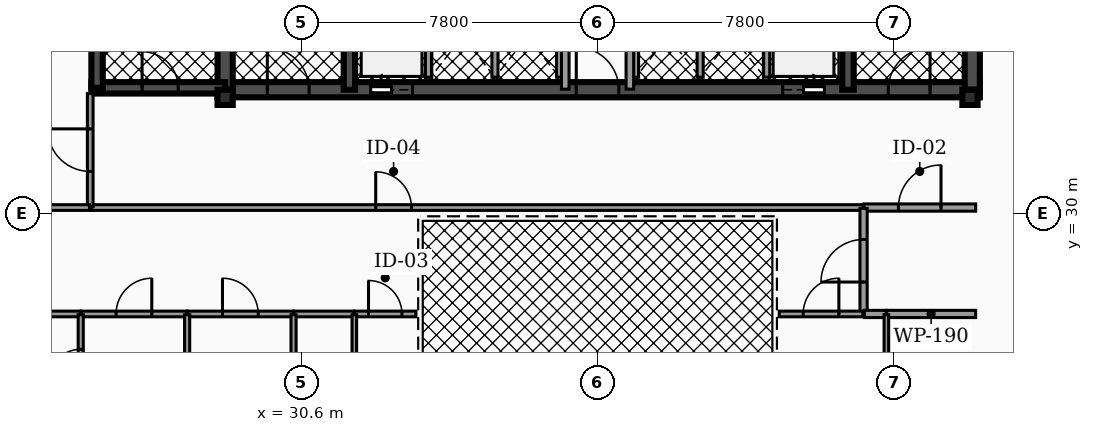
"""IFC4 building model, lengths in metres.
Left out: names, types, materials, properties, quantities, classifications, styles, units other than length and angle.
Written with IfcOpenShell. Run it as: python <this file> out.ifc"""

import sys

from ifc_helpers import new_model, si_unit, direction, frame, frame_2d, origin, origin_2d, place, context, subcontext, project, spatial, rectangle, hollow_rectangle, extrude, element, fill, save


model = new_model("IFC4")
c1 = context("Model", 3, precision=1e-05, world=origin(), true_north=direction((0.0, 1.0)))
c2 = subcontext(c1, "Body", "Model", "MODEL_VIEW")
j1 = project(units=[si_unit("LENGTHUNIT", "METRE"), si_unit("PLANEANGLEUNIT", "RADIAN")], contexts=[c1])
p1 = place(None, origin())
s1 = spatial("IfcSite", under=j1, at=p1, CompositionType="ELEMENT")
p2 = place(p1, origin())
s2 = spatial("IfcBuilding", under=s1, at=p2, CompositionType="ELEMENT")
p3 = place(p2, frame((0.0, 0.0, 13.94)))
s3 = spatial("IfcBuildingStorey", under=s2, at=p3, CompositionType="ELEMENT", Elevation=13.94)
p4 = place(p3, frame((28.4, 33.25, 0.0), z_axis=(0.0, 0.0, 1.0), x_axis=(1.0, 0.0, 0.0)))
e1 = element("IfcWall", 1, at=p4, inside=s3, PredefinedType="SHEAR", context=c2, shape_type="SweptSolid", body=[
    extrude(rectangle(XDim=20.06, YDim=0.4, at=frame_2d((10.03, 0.0))), origin(), (0.0, 0.0, 1.0), 4.14),
])
p5 = place(p4, frame((4.03, 0.0, 0.0)))
e2 = element("IfcOpeningElement", 2, at=p5, cuts=e1, PredefinedType="OPENING", context=c2, shape_type="SweptSolid", body=[
    extrude(rectangle(XDim=1.1, YDim=2.15, at=frame_2d((0.55, 1.075))), frame((0.0, 0.21, 0.0), z_axis=(0.0, -1.0, 0.0), x_axis=(1.0, 0.0, 0.0)), (0.0, 0.0, 1.0), 0.42),
])
p6 = place(p4, frame((14.87, 0.0, 0.0)))
e3 = element("IfcOpeningElement", 3, at=p6, cuts=e1, PredefinedType="OPENING", context=c2, shape_type="SweptSolid", body=[
    extrude(rectangle(XDim=1.1, YDim=2.15, at=frame_2d((0.55, 1.075))), frame((0.0, 0.21, 0.0), z_axis=(0.0, -1.0, 0.0), x_axis=(1.0, 0.0, 0.0)), (0.0, 0.0, 1.0), 0.42),
])
p7 = place(p4, frame((1.31, 0.0, 0.0)))
e4 = element("IfcOpeningElement", 4, at=p7, cuts=e1, PredefinedType="OPENING", context=c2, shape_type="SweptSolid", body=[
    extrude(rectangle(XDim=1.1, YDim=2.2, at=frame_2d((0.55, 1.1))), frame((0.0, 0.21, 0.0), z_axis=(0.0, -1.0, 0.0), x_axis=(1.0, 0.0, 0.0)), (0.0, 0.0, 1.0), 0.42),
])
p8 = place(p4, frame((9.44, 0.0, 0.0)))
e5 = element("IfcOpeningElement", 5, at=p8, cuts=e1, PredefinedType="OPENING", context=c2, shape_type="SweptSolid", body=[
    extrude(rectangle(XDim=1.12, YDim=2.05, at=frame_2d((0.56, 1.025))), frame((0.0, 0.21, 0.0), z_axis=(0.0, -1.0, 0.0), x_axis=(1.0, 0.0, 0.0)), (0.0, 0.0, 1.0), 0.42),
])
p9 = place(p4, frame((17.65, 0.0, 0.0)))
e6 = element("IfcOpeningElement", 6, at=p9, cuts=e1, PredefinedType="OPENING", context=c2, shape_type="SweptSolid", body=[
    extrude(rectangle(XDim=1.1, YDim=2.2, at=frame_2d((0.55, 1.1))), frame((0.0, 0.21, 0.0), z_axis=(0.0, -1.0, 0.0), x_axis=(1.0, 0.0, 0.0)), (0.0, 0.0, 1.0), 0.42),
])
p10 = place(p3, frame((28.6, 33.25, 0.0), z_axis=(0.0, 0.0, 1.0), x_axis=(0.0, 1.0, 0.0)))
e7 = element("IfcWall", 7, at=p10, inside=s3, PredefinedType="SHEAR", context=c2, shape_type="SweptSolid", body=[
    extrude(rectangle(XDim=10.2, YDim=0.4, at=frame_2d((5.1, 0.0))), origin(), (0.0, 0.0, 1.0), 4.14),
])
for number, where, z_axis, x_axis in (
    (8, (31.87, 33.25, 0.0), (0.0, 0.0, 1.0), (0.0, 1.0, 0.0)),
    (9, (44.99, 33.25, 0.0), (0.0, 0.0, 1.0), (0.0, 1.0, 0.0)),
):
    element("IfcWall", number, at=place(p3, frame(where, z_axis=z_axis, x_axis=x_axis)), inside=s3, PredefinedType="SHEAR", context=c2, shape_type="SweptSolid", body=[
        extrude(rectangle(XDim=10.2, YDim=0.3, at=frame_2d((5.1, 0.0))), origin(), (0.0, 0.0, 1.0), 4.14),
    ])
p11 = place(p3, frame((48.26, 33.25, 0.0), z_axis=(0.0, 0.0, 1.0), x_axis=(0.0, 1.0, 0.0)))
e10 = element("IfcWall", 10, at=p11, inside=s3, PredefinedType="SHEAR", context=c2, shape_type="SweptSolid", body=[
    extrude(rectangle(XDim=10.2, YDim=0.4, at=frame_2d((5.1, 0.0))), origin(), (0.0, 0.0, 1.0), 4.14),
])
p12 = place(p3, frame((25.08, 33.3, 0.0), z_axis=(0.0, 0.0, 1.0), x_axis=(1.0, 0.0, 0.0)))
e11 = element("IfcWall", 11, at=p12, inside=s3, PredefinedType="SHEAR", context=c2, shape_type="SweptSolid", body=[
    extrude(rectangle(XDim=3.52, YDim=0.3, at=frame_2d((1.76, 0.0))), origin(), (0.0, 0.0, 1.0), 4.14),
])
p13 = place(p12, frame((1.335, 0.0, 0.0)))
e12 = element("IfcOpeningElement", 12, at=p13, cuts=e11, PredefinedType="OPENING", context=c2, shape_type="SweptSolid", body=[
    extrude(rectangle(XDim=0.95, YDim=2.2, at=frame_2d((0.475, 1.1))), frame((0.0, 0.16, 0.0), z_axis=(0.0, -1.0, 0.0), x_axis=(1.0, 0.0, 0.0)), (0.0, 0.0, 1.0), 0.32),
])
p14 = place(p3, frame((25.23, 33.3, 0.0), z_axis=(0.0, 0.0, 1.0), x_axis=(0.0, 1.0, 0.0)))
e13 = element("IfcWall", 13, at=p14, inside=s3, PredefinedType="SHEAR", context=c2, shape_type="SweptSolid", body=[
    extrude(rectangle(XDim=7.6, YDim=0.3, at=frame_2d((3.8, 0.0))), origin(), (0.0, 0.0, 1.0), 4.14),
])
for number, where, z_axis, x_axis in (
    (14, (28.6, 33.05, 0.0), (0.0, 0.0, 1.0), (1.0, 0.0, 0.0)),
    (15, (48.2, 33.05, 0.0), (0.0, 0.0, 1.0), (1.0, 0.0, 0.0)),
):
    element("IfcColumn", number, at=place(p3, frame(where, z_axis=z_axis, x_axis=x_axis)), inside=s3, PredefinedType="PILASTER", context=c2, shape_type="SweptSolid", body=[
        extrude(hollow_rectangle(XDim=0.4, YDim=0.4, WallThickness=0.02, at=origin_2d()), origin(), (0.0, 0.0, 1.0), 4.14),
    ])
for number, where, z_axis, x_axis in (
    (16, (33.95, 33.58, 0.0), (0.0, 0.0, 1.0), (0.0, 1.0, 0.0)),
    (17, (42.85, 33.58, 0.0), (0.0, 0.0, 1.0), (0.0, 1.0, 0.0)),
):
    element("IfcWall", number, at=place(p3, frame(where, z_axis=z_axis, x_axis=x_axis)), inside=s3, PredefinedType="SOLIDWALL", context=c2, shape_type="SweptSolid", body=[
        extrude(rectangle(XDim=2.45, YDim=0.16, at=frame_2d((1.225, 0.0))), origin(), (0.0, 0.0, 1.0), 3.112),
    ])
for number, where, z_axis, x_axis in (
    (18, (35.7, 33.58, 0.0), (0.0, 0.0, 1.0), (0.0, 1.0, 0.0)),
    (19, (37.4, 33.58, 0.0), (0.0, 0.0, 1.0), (0.0, 1.0, 0.0)),
    (20, (39.4, 33.58, 0.0), (0.0, 0.0, 1.0), (0.0, 1.0, 0.0)),
    (21, (41.1, 33.58, 0.0), (0.0, 0.0, 1.0), (0.0, 1.0, 0.0)),
):
    element("IfcWall", number, at=place(p3, frame(where, z_axis=z_axis, x_axis=x_axis)), inside=s3, PredefinedType="SOLIDWALL", context=c2, shape_type="SweptSolid", body=[
        extrude(rectangle(XDim=2.25, YDim=0.16, at=frame_2d((1.125, 0.0))), origin(), (0.0, 0.0, 1.0), 3.112),
    ])
p15 = place(p3, frame((37.55, 33.265, 0.0), z_axis=(0.0, 0.0, 1.0), x_axis=(0.0, 1.0, 0.0)))
e22 = element("IfcWall", 22, at=p15, inside=s3, PredefinedType="PARTITIONING", context=c2, shape_type="SweptSolid", body=[
    extrude(rectangle(XDim=4.265, YDim=0.2, at=frame_2d((2.133, 0.0))), origin(), (0.0, 0.0, 1.0), 3.097),
])
p16 = place(p15, frame((3.093, 0.0, 0.0)))
e23 = element("IfcOpeningElement", 23, at=p16, cuts=e22, PredefinedType="OPENING", context=c2, shape_type="SweptSolid", body=[
    extrude(rectangle(XDim=0.88, YDim=2.05, at=frame_2d((0.44, 1.025))), frame((0.0, 0.11, 0.0), z_axis=(0.0, -1.0, 0.0), x_axis=(1.0, 0.0, 0.0)), (0.0, 0.0, 1.0), 0.22),
])
p17 = place(p3, frame((39.25, 33.265, 0.0), z_axis=(0.0, 0.0, 1.0), x_axis=(0.0, 1.0, 0.0)))
e24 = element("IfcWall", 24, at=p17, inside=s3, PredefinedType="PARTITIONING", context=c2, shape_type="SweptSolid", body=[
    extrude(rectangle(XDim=4.265, YDim=0.2, at=frame_2d((2.133, 0.0))), origin(), (0.0, 0.0, 1.0), 3.097),
])
p18 = place(p17, frame((3.093, 0.0, 0.0)))
e25 = element("IfcOpeningElement", 25, at=p18, cuts=e24, PredefinedType="OPENING", context=c2, shape_type="SweptSolid", body=[
    extrude(rectangle(XDim=0.88, YDim=2.05, at=frame_2d((0.44, 1.025))), frame((0.0, 0.11, 0.0), z_axis=(0.0, -1.0, 0.0), x_axis=(1.0, 0.0, 0.0)), (0.0, 0.0, 1.0), 0.22),
])
p19 = place(p3, frame((45.405, 30.15, 0.0), z_axis=(0.0, 0.0, 1.0), x_axis=(1.0, 0.0, 0.0)))
e26 = element("IfcWall", 26, at=p19, inside=s3, PredefinedType="PARTITIONING", context=c2, shape_type="SweptSolid", body=[
    extrude(rectangle(XDim=2.945, YDim=0.19, at=frame_2d((1.473, 0.0))), origin(), (0.0, 0.0, 1.0), 3.097),
])
p20 = place(p19, frame((0.913, 0.0, 0.0)))
e27 = element("IfcOpeningElement", 27, at=p20, cuts=e26, PredefinedType="OPENING", context=c2, shape_type="SweptSolid", body=[
    extrude(rectangle(XDim=1.12, YDim=2.05, at=frame_2d((0.56, 1.025))), frame((0.0, 0.105, 0.0), z_axis=(0.0, -1.0, 0.0), x_axis=(1.0, 0.0, 0.0)), (0.0, 0.0, 1.0), 0.21),
])
p21 = place(p3, frame((25.07, 30.15, 0.0), z_axis=(0.0, 0.0, 1.0), x_axis=(1.0, 0.0, 0.0)))
e28 = element("IfcWall", 28, at=p21, inside=s3, PredefinedType="PARTITIONING", context=c2, shape_type="SweptSolid", body=[
    extrude(rectangle(XDim=20.325, YDim=0.15, at=frame_2d((10.163, 0.0))), origin(), (0.0, 0.0, 1.0), 3.097),
])
p22 = place(p21, frame((7.492, 0.0, 0.0)))
e29 = element("IfcOpeningElement", 29, at=p22, cuts=e28, PredefinedType="OPENING", context=c2, shape_type="SweptSolid", body=[
    extrude(rectangle(XDim=0.94, YDim=2.05, at=frame_2d((0.47, 1.025))), frame((0.0, 0.085, 0.0), z_axis=(0.0, -1.0, 0.0), x_axis=(1.0, 0.0, 0.0)), (0.0, 0.0, 1.0), 0.17),
])
p23 = place(p3, frame((25.05, 30.17, 0.0), z_axis=(0.0, 0.0, 1.0), x_axis=(0.0, 1.0, 0.0)))
e30 = element("IfcWall", 30, at=p23, inside=s3, PredefinedType="PARTITIONING", context=c2, shape_type="SweptSolid", body=[
    extrude(rectangle(XDim=2.98, YDim=0.15, at=frame_2d((1.49, 0.0))), origin(), (0.0, 0.0, 1.0), 3.097),
])
p24 = place(p23, frame((0.93, 0.0, 0.0)))
e31 = element("IfcOpeningElement", 31, at=p24, cuts=e30, PredefinedType="OPENING", context=c2, shape_type="SweptSolid", body=[
    extrude(rectangle(XDim=1.12, YDim=2.05, at=frame_2d((0.56, 1.025))), frame((0.0, 0.085, 0.0), z_axis=(0.0, -1.0, 0.0), x_axis=(1.0, 0.0, 0.0)), (0.0, 0.0, 1.0), 0.17),
])
p25 = place(p3, frame((45.4, 27.37, 0.0), z_axis=(0.0, 0.0, 1.0), x_axis=(0.0, 1.0, 0.0)))
e32 = element("IfcWall", 32, at=p25, inside=s3, PredefinedType="PARTITIONING", context=c2, shape_type="SweptSolid", body=[
    extrude(rectangle(XDim=2.76, YDim=0.19, at=frame_2d((1.38, 0.0))), origin(), (0.0, 0.0, 1.0), 3.097),
])
p26 = place(p25, frame((0.82, 0.0, 0.0)))
e33 = element("IfcOpeningElement", 33, at=p26, cuts=e32, PredefinedType="OPENING", context=c2, shape_type="SweptSolid", body=[
    extrude(rectangle(XDim=1.12, YDim=2.05, at=frame_2d((0.56, 1.025))), frame((0.0, 0.105, 0.0), z_axis=(0.0, -1.0, 0.0), x_axis=(1.0, 0.0, 0.0)), (0.0, 0.0, 1.0), 0.21),
])
p27 = place(p3, frame((46.005, 27.35, 0.0), z_axis=(0.0, 0.0, 1.0), x_axis=(1.0, 0.0, 0.0)))
e34 = element("IfcWall", 34, at=p27, inside=s3, PredefinedType="PARTITIONING", context=c2, shape_type="SweptSolid", body=[
    extrude(rectangle(XDim=2.345, YDim=0.19, at=frame_2d((1.173, 0.0))), origin(), (0.0, 0.0, 1.0), 3.097),
])
p28 = place(p3, frame((45.42, 27.35, 0.0), z_axis=(0.0, 0.0, 1.0), x_axis=(1.0, 0.0, 0.0)))
e35 = element("IfcWall", 35, at=p28, inside=s3, PredefinedType="PARTITIONING", context=c2, shape_type="SweptSolid", body=[
    extrude(rectangle(XDim=0.575, YDim=0.19, at=frame_2d((0.288, 0.0))), origin(), (0.0, 0.0, 1.0), 3.097),
])
p29 = place(p3, frame((22.8, 27.35, 0.0), z_axis=(0.0, 0.0, 1.0), x_axis=(1.0, 0.0, 0.0)))
e36 = element("IfcWall", 36, at=p29, inside=s3, PredefinedType="PARTITIONING", context=c2, shape_type="SweptSolid", body=[
    extrude(rectangle(XDim=1.995, YDim=0.15, at=frame_2d((0.998, 0.0))), origin(), (0.0, 0.0, 1.0), 3.097),
])
p30 = place(p3, frame((24.805, 27.35, 0.0), z_axis=(0.0, 0.0, 1.0), x_axis=(1.0, 0.0, 0.0)))
e37 = element("IfcWall", 37, at=p30, inside=s3, PredefinedType="PARTITIONING", context=c2, shape_type="SweptSolid", body=[
    extrude(rectangle(XDim=2.79, YDim=0.15, at=frame_2d((1.395, 0.0))), origin(), (0.0, 0.0, 1.0), 3.097),
])
p31 = place(p30, frame((0.925, 0.0, 0.0)))
e38 = element("IfcOpeningElement", 38, at=p31, cuts=e37, PredefinedType="OPENING", context=c2, shape_type="SweptSolid", body=[
    extrude(rectangle(XDim=0.94, YDim=2.05, at=frame_2d((0.47, 1.025))), frame((0.0, 0.085, 0.0), z_axis=(0.0, -1.0, 0.0), x_axis=(1.0, 0.0, 0.0)), (0.0, 0.0, 1.0), 0.17),
])
p32 = place(p3, frame((27.605, 27.35, 0.0), z_axis=(0.0, 0.0, 1.0), x_axis=(1.0, 0.0, 0.0)))
e39 = element("IfcWall", 39, at=p32, inside=s3, PredefinedType="PARTITIONING", context=c2, shape_type="SweptSolid", body=[
    extrude(rectangle(XDim=2.79, YDim=0.15, at=frame_2d((1.395, 0.0))), origin(), (0.0, 0.0, 1.0), 3.097),
])
p33 = place(p32, frame((0.925, 0.0, 0.0)))
e40 = element("IfcOpeningElement", 40, at=p33, cuts=e39, PredefinedType="OPENING", context=c2, shape_type="SweptSolid", body=[
    extrude(rectangle(XDim=0.94, YDim=2.05, at=frame_2d((0.47, 1.025))), frame((0.0, 0.085, 0.0), z_axis=(0.0, -1.0, 0.0), x_axis=(1.0, 0.0, 0.0)), (0.0, 0.0, 1.0), 0.17),
])
p34 = place(p3, frame((30.405, 27.35, 0.0), z_axis=(0.0, 0.0, 1.0), x_axis=(1.0, 0.0, 0.0)))
e41 = element("IfcWall", 41, at=p34, inside=s3, PredefinedType="PARTITIONING", context=c2, shape_type="SweptSolid", body=[
    extrude(rectangle(XDim=1.59, YDim=0.15, at=frame_2d((0.795, 0.0))), origin(), (0.0, 0.0, 1.0), 3.097),
])
p35 = place(p3, frame((32.005, 27.35, 0.0), z_axis=(0.0, 0.0, 1.0), x_axis=(1.0, 0.0, 0.0)))
e42 = element("IfcWall", 42, at=p35, inside=s3, PredefinedType="PARTITIONING", context=c2, shape_type="SweptSolid", body=[
    extrude(rectangle(XDim=1.615, YDim=0.15, at=frame_2d((0.808, 0.0))), origin(), (0.0, 0.0, 1.0), 3.097),
])
p36 = place(p35, frame((0.367, 0.0, 0.0)))
e43 = element("IfcOpeningElement", 43, at=p36, cuts=e42, PredefinedType="OPENING", context=c2, shape_type="SweptSolid", body=[
    extrude(rectangle(XDim=0.88, YDim=2.05, at=frame_2d((0.44, 1.025))), frame((0.0, 0.085, 0.0), z_axis=(0.0, -1.0, 0.0), x_axis=(1.0, 0.0, 0.0)), (0.0, 0.0, 1.0), 0.17),
])
p37 = place(p3, frame((43.18, 27.35, 0.0), z_axis=(0.0, 0.0, 1.0), x_axis=(1.0, 0.0, 0.0)))
e44 = element("IfcWall", 44, at=p37, inside=s3, PredefinedType="PARTITIONING", context=c2, shape_type="SweptSolid", body=[
    extrude(rectangle(XDim=2.2, YDim=0.15, at=frame_2d((1.1, 0.0))), origin(), (0.0, 0.0, 1.0), 3.097),
])
p38 = place(p37, frame((0.63, 0.0, 0.0)))
e45 = element("IfcOpeningElement", 45, at=p38, cuts=e44, PredefinedType="OPENING", context=c2, shape_type="SweptSolid", body=[
    extrude(rectangle(XDim=0.94, YDim=2.05, at=frame_2d((0.47, 1.025))), frame((0.0, 0.085, 0.0), z_axis=(0.0, -1.0, 0.0), x_axis=(1.0, 0.0, 0.0)), (0.0, 0.0, 1.0), 0.17),
])
p39 = place(p3, frame((22.8, 30.15, 0.0), z_axis=(0.0, 0.0, 1.0), x_axis=(1.0, 0.0, 0.0)))
e46 = element("IfcWall", 46, at=p39, inside=s3, PredefinedType="PARTITIONING", context=c2, shape_type="SweptSolid", body=[
    extrude(rectangle(XDim=2.23, YDim=0.15, at=frame_2d((1.115, 0.0))), origin(), (0.0, 0.0, 1.0), 3.097),
])
p40 = place(p3, frame((24.8, 23.848, 0.0), z_axis=(0.0, 0.0, 1.0), x_axis=(0.0, 1.0, 0.0)))
e47 = element("IfcWall", 47, at=p40, inside=s3, PredefinedType="PARTITIONING", context=c2, shape_type="SweptSolid", body=[
    extrude(rectangle(XDim=3.482, YDim=0.135, at=frame_2d((1.741, 0.0))), origin(), (0.0, 0.0, 1.0), 3.097),
])
p41 = place(p40, frame((1.711, 0.0, 0.0)))
e48 = element("IfcOpeningElement", 48, at=p41, cuts=e47, PredefinedType="OPENING", context=c2, shape_type="SweptSolid", body=[
    extrude(rectangle(XDim=0.86, YDim=2.05, at=frame_2d((0.43, 1.025))), frame((0.0, 0.077, 0.0), z_axis=(0.0, -1.0, 0.0), x_axis=(1.0, 0.0, 0.0)), (0.0, 0.0, 1.0), 0.155),
])
for number, where, z_axis, x_axis in (
    (49, (27.6, 23.82, 0.0), (0.0, 0.0, 1.0), (0.0, 1.0, 0.0)),
    (50, (30.4, 23.82, 0.0), (0.0, 0.0, 1.0), (0.0, 1.0, 0.0)),
):
    element("IfcWall", number, at=place(p3, frame(where, z_axis=z_axis, x_axis=x_axis)), inside=s3, PredefinedType="PARTITIONING", context=c2, shape_type="SweptSolid", body=[
        extrude(rectangle(XDim=3.51, YDim=0.135, at=frame_2d((1.755, 0.0))), origin(), (0.0, 0.0, 1.0), 3.097),
    ])
for number, where, z_axis, x_axis in (
    (51, (46.0, 18.02, 0.0), (0.0, 0.0, 1.0), (0.0, 1.0, 0.0)),
    (52, (32.0, 18.02, 0.0), (0.0, 0.0, 1.0), (0.0, 1.0, 0.0)),
):
    element("IfcWall", number, at=place(p3, frame(where, z_axis=z_axis, x_axis=x_axis)), inside=s3, PredefinedType="PARTITIONING", context=c2, shape_type="SweptSolid", body=[
        extrude(rectangle(XDim=9.31, YDim=0.12, at=frame_2d((4.655, 0.0))), origin(), (0.0, 0.0, 1.0), 3.097),
    ])
p42 = place(p5, origin())
e53 = element("IfcDoor", 53, at=p42, inside=s3, OperationType="SLIDING_TO_LEFT", PredefinedType="DOOR", context=c2, shape_type="SweptSolid", body=[
    extrude(rectangle(XDim=1.1, YDim=2.15, at=frame_2d((0.55, 1.075))), frame((0.0, 0.025, 0.0), z_axis=(0.0, -1.0, 0.0), x_axis=(1.0, 0.0, 0.0)), (0.0, 0.0, 1.0), 0.05),
])
fill(e2, e53)
p43 = place(p6, origin())
e54 = element("IfcDoor", 54, at=p43, inside=s3, OperationType="SLIDING_TO_RIGHT", PredefinedType="DOOR", context=c2, shape_type="SweptSolid", body=[
    extrude(rectangle(XDim=1.1, YDim=2.15, at=frame_2d((0.55, 1.075))), frame((0.0, 0.025, 0.0), z_axis=(0.0, -1.0, 0.0), x_axis=(1.0, 0.0, 0.0)), (0.0, 0.0, 1.0), 0.05),
])
fill(e3, e54)
p44 = place(p7, origin())
e55 = element("IfcDoor", 55, at=p44, inside=s3, OperationType="SINGLE_SWING_LEFT", PredefinedType="DOOR", context=c2, shape_type="SweptSolid", body=[
    extrude(rectangle(XDim=1.1, YDim=2.2, at=frame_2d((0.55, 1.1))), frame((0.0, 0.025, 0.0), z_axis=(0.0, -1.0, 0.0), x_axis=(1.0, 0.0, 0.0)), (0.0, 0.0, 1.0), 0.05),
])
fill(e4, e55)
p45 = place(p8, origin())
e56 = element("IfcDoor", 56, at=p45, inside=s3, OperationType="SINGLE_SWING_LEFT", PredefinedType="DOOR", context=c2, shape_type="SweptSolid", body=[
    extrude(rectangle(XDim=1.12, YDim=2.05, at=frame_2d((0.56, 1.025))), frame((0.0, 0.025, 0.0), z_axis=(0.0, -1.0, 0.0), x_axis=(1.0, 0.0, 0.0)), (0.0, 0.0, 1.0), 0.05),
])
fill(e5, e56)
p46 = place(p9, origin())
e57 = element("IfcDoor", 57, at=p46, inside=s3, OperationType="SINGLE_SWING_RIGHT", PredefinedType="DOOR", context=c2, shape_type="SweptSolid", body=[
    extrude(rectangle(XDim=1.1, YDim=2.2, at=frame_2d((0.55, 1.1))), frame((0.0, 0.025, 0.0), z_axis=(0.0, -1.0, 0.0), x_axis=(1.0, 0.0, 0.0)), (0.0, 0.0, 1.0), 0.05),
])
fill(e6, e57)
p47 = place(p13, origin())
e58 = element("IfcDoor", 58, at=p47, inside=s3, OperationType="SINGLE_SWING_LEFT", PredefinedType="DOOR", context=c2, shape_type="SweptSolid", body=[
    extrude(rectangle(XDim=0.95, YDim=2.2, at=frame_2d((0.475, 1.1))), frame((0.0, 0.025, 0.0), z_axis=(0.0, -1.0, 0.0), x_axis=(1.0, 0.0, 0.0)), (0.0, 0.0, 1.0), 0.05),
])
fill(e12, e58)
p48 = place(p20, origin())
e59 = element("IfcDoor", 59, at=p48, inside=s3, OperationType="SINGLE_SWING_RIGHT", PredefinedType="DOOR", context=c2, shape_type="SweptSolid", body=[
    extrude(rectangle(XDim=1.12, YDim=2.05, at=frame_2d((0.56, 1.025))), frame((0.0, 0.025, 0.0), z_axis=(0.0, -1.0, 0.0), x_axis=(1.0, 0.0, 0.0)), (0.0, 0.0, 1.0), 0.05),
])
fill(e27, e59)
p49 = place(p22, origin())
e60 = element("IfcDoor", 60, at=p49, inside=s3, OperationType="SINGLE_SWING_LEFT", PredefinedType="DOOR", context=c2, shape_type="SweptSolid", body=[
    extrude(rectangle(XDim=0.94, YDim=2.05, at=frame_2d((0.47, 1.025))), frame((0.0, 0.025, 0.0), z_axis=(0.0, -1.0, 0.0), x_axis=(1.0, 0.0, 0.0)), (0.0, 0.0, 1.0), 0.05),
])
fill(e29, e60)
p50 = place(p24, origin())
e61 = element("IfcDoor", 61, at=p50, inside=s3, OperationType="SINGLE_SWING_RIGHT", PredefinedType="DOOR", context=c2, shape_type="SweptSolid", body=[
    extrude(rectangle(XDim=1.12, YDim=2.05, at=frame_2d((0.56, 1.025))), frame((0.0, 0.025, 0.0), z_axis=(0.0, -1.0, 0.0), x_axis=(1.0, 0.0, 0.0)), (0.0, 0.0, 1.0), 0.05),
])
fill(e31, e61)
p51 = place(p26, origin())
e62 = element("IfcDoor", 62, at=p51, inside=s3, OperationType="SINGLE_SWING_LEFT", PredefinedType="DOOR", context=c2, shape_type="SweptSolid", body=[
    extrude(rectangle(XDim=1.12, YDim=2.05, at=frame_2d((0.56, 1.025))), frame((0.0, 0.025, 0.0), z_axis=(0.0, -1.0, 0.0), x_axis=(1.0, 0.0, 0.0)), (0.0, 0.0, 1.0), 0.05),
])
fill(e33, e62)
p52 = place(p31, origin())
e63 = element("IfcDoor", 63, at=p52, inside=s3, OperationType="SINGLE_SWING_RIGHT", PredefinedType="DOOR", context=c2, shape_type="SweptSolid", body=[
    extrude(rectangle(XDim=0.94, YDim=2.05, at=frame_2d((0.47, 1.025))), frame((0.0, 0.025, 0.0), z_axis=(0.0, -1.0, 0.0), x_axis=(1.0, 0.0, 0.0)), (0.0, 0.0, 1.0), 0.05),
])
fill(e38, e63)
p53 = place(p33, origin())
e64 = element("IfcDoor", 64, at=p53, inside=s3, OperationType="SINGLE_SWING_LEFT", PredefinedType="DOOR", context=c2, shape_type="SweptSolid", body=[
    extrude(rectangle(XDim=0.94, YDim=2.05, at=frame_2d((0.47, 1.025))), frame((0.0, 0.025, 0.0), z_axis=(0.0, -1.0, 0.0), x_axis=(1.0, 0.0, 0.0)), (0.0, 0.0, 1.0), 0.05),
])
fill(e40, e64)
p54 = place(p36, origin())
e65 = element("IfcDoor", 65, at=p54, inside=s3, OperationType="SINGLE_SWING_LEFT", PredefinedType="DOOR", context=c2, shape_type="SweptSolid", body=[
    extrude(rectangle(XDim=0.88, YDim=2.05, at=frame_2d((0.44, 1.025))), frame((0.0, 0.025, 0.0), z_axis=(0.0, -1.0, 0.0), x_axis=(1.0, 0.0, 0.0)), (0.0, 0.0, 1.0), 0.05),
])
fill(e43, e65)
p55 = place(p38, origin())
e66 = element("IfcDoor", 66, at=p55, inside=s3, OperationType="SINGLE_SWING_RIGHT", PredefinedType="DOOR", context=c2, shape_type="SweptSolid", body=[
    extrude(rectangle(XDim=0.94, YDim=2.05, at=frame_2d((0.47, 1.025))), frame((0.0, 0.025, 0.0), z_axis=(0.0, -1.0, 0.0), x_axis=(1.0, 0.0, 0.0)), (0.0, 0.0, 1.0), 0.05),
])
fill(e45, e66)
p56 = place(p41, origin())
e67 = element("IfcDoor", 67, at=p56, inside=s3, OperationType="SINGLE_SWING_LEFT", PredefinedType="DOOR", context=c2, shape_type="SweptSolid", body=[
    extrude(rectangle(XDim=0.86, YDim=2.05, at=frame_2d((0.43, 1.025))), frame((0.0, 0.025, 0.0), z_axis=(0.0, -1.0, 0.0), x_axis=(1.0, 0.0, 0.0)), (0.0, 0.0, 1.0), 0.05),
])
fill(e48, e67)
save(model, sys.argv[1])
